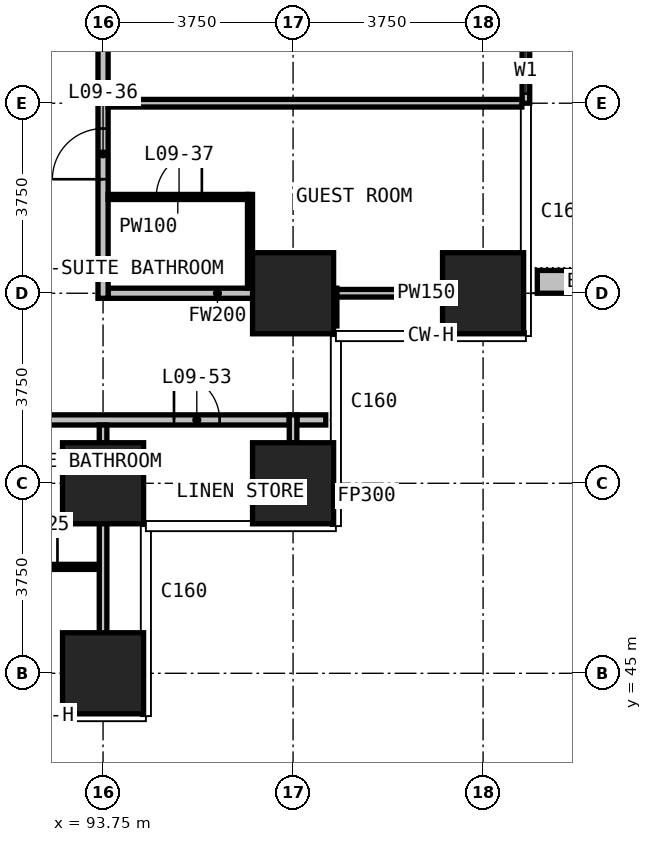
"""IFC4 building model, lengths in metres.
Left out: names, types, materials, properties, quantities, classifications, styles, units other than length and angle.
Written with IfcOpenShell. Run it as: python <this file> out.ifc"""

import sys

from ifc_helpers import new_model, si_unit, direction, frame, frame_2d, origin, origin_2d, place, context, subcontext, project, spatial, rectangle, extrude, element, fill, save


model = new_model("IFC4")
c1 = context("Model", 3, precision=1e-05, world=origin(), true_north=direction((0.0, 1.0)))
c2 = subcontext(c1, "Body", "Model", "MODEL_VIEW")
j1 = project(units=[si_unit("LENGTHUNIT", "METRE"), si_unit("PLANEANGLEUNIT", "RADIAN")], contexts=[c1])
p1 = place(None, origin())
s1 = spatial("IfcSite", under=j1, at=p1, CompositionType="ELEMENT")
p2 = place(p1, origin())
s2 = spatial("IfcBuilding", under=s1, at=p2, CompositionType="ELEMENT")
p3 = place(p2, frame((0.0, 0.0, 49.4)))
s3 = spatial("IfcBuildingStorey", under=s2, at=p3, CompositionType="ELEMENT", Elevation=49.4)
for number, where, z_axis, x_axis in (
    (1, (93.75, 45.0, 0.0), (0.0, 0.0, 1.0), (1.0, 0.0, 0.0)),
    (2, (93.75, 48.75, 0.0), (0.0, 0.0, 1.0), (1.0, 0.0, 0.0)),
    (3, (97.5, 48.75, 0.0), (0.0, 0.0, 1.0), (1.0, 0.0, 0.0)),
    (4, (97.5, 52.5, 0.0), (0.0, 0.0, 1.0), (1.0, 0.0, 0.0)),
    (5, (101.25, 52.5, 0.0), (0.0, 0.0, 1.0), (1.0, 0.0, 0.0)),
):
    element("IfcColumn", number, at=place(p3, frame(where, z_axis=z_axis, x_axis=x_axis)), inside=s3, PredefinedType="COLUMN", context=c2, shape_type="SweptSolid", body=[
        extrude(rectangle(XDim=1.6, YDim=1.6, at=origin_2d()), origin(), (0.0, 0.0, 1.0), 3.3),
    ])
p4 = place(p3, frame((102.095, 56.25, 0.0), z_axis=(0.0, 0.0, 1.0), x_axis=(0.0, 1.0, 0.0)))
e6 = element("IfcWall", 6, at=p4, inside=s3, PredefinedType="SOLIDWALL", context=c2, shape_type="SweptSolid", body=[
    extrude(rectangle(XDim=3.75, YDim=0.15, at=frame_2d((1.875, 0.0))), origin(), (0.0, 0.0, 1.0), 3.0),
])
p5 = place(p4, frame((0.188, 0.0, 0.1)))
e7 = element("IfcOpeningElement", 7, at=p5, cuts=e6, PredefinedType="OPENING", context=c2, shape_type="SweptSolid", body=[
    extrude(rectangle(XDim=0.9, YDim=2.4, at=frame_2d((0.45, 1.2))), frame((0.0, 0.085, 0.0), z_axis=(0.0, -1.0, 0.0), x_axis=(1.0, 0.0, 0.0)), (0.0, 0.0, 1.0), 0.17),
])
p6 = place(p4, frame((1.275, 0.0, 0.0)))
e8 = element("IfcOpeningElement", 8, at=p6, cuts=e6, PredefinedType="OPENING", context=c2, shape_type="SweptSolid", body=[
    extrude(rectangle(XDim=1.2, YDim=2.4, at=frame_2d((0.6, 1.2))), frame((0.0, 0.085, 0.0), z_axis=(0.0, -1.0, 0.0), x_axis=(1.0, 0.0, 0.0)), (0.0, 0.0, 1.0), 0.17),
])
p7 = place(p3, frame((102.32, 52.725, 0.0), z_axis=(0.0, 0.0, 1.0), x_axis=(1.0, 0.0, 0.0)))
e9 = element("IfcWall", 9, at=p7, inside=s3, PredefinedType="USERDEFINED", context=c2, shape_type="SweptSolid", body=[
    extrude(rectangle(XDim=2.33, YDim=0.45, at=frame_2d((1.165, 0.0))), origin(), (0.0, 0.0, 1.0), 1.1),
])
p8 = place(p3, frame((52.575, 50.0, 0.0), z_axis=(0.0, 0.0, 1.0), x_axis=(1.0, 0.0, 0.0)))
e10 = element("IfcWall", 10, at=p8, inside=s3, PredefinedType="PARTITIONING", context=c2, shape_type="SweptSolid", body=[
    extrude(rectangle(XDim=44.85, YDim=0.2, at=frame_2d((22.425, 0.0))), origin(), (0.0, 0.0, 1.0), 3.0),
])
p9 = place(p8, frame((5.925, 0.0, 0.0)))
e11 = element("IfcOpeningElement", 11, at=p9, cuts=e10, PredefinedType="OPENING", context=c2, shape_type="SweptSolid", body=[
    extrude(rectangle(XDim=1.0, YDim=2.2, at=frame_2d((0.5, 1.1))), frame((0.0, 0.11, 0.0), z_axis=(0.0, -1.0, 0.0), x_axis=(1.0, 0.0, 0.0)), (0.0, 0.0, 1.0), 0.22),
])
p10 = place(p8, frame((7.925, 0.0, 0.0)))
e12 = element("IfcOpeningElement", 12, at=p10, cuts=e10, PredefinedType="OPENING", context=c2, shape_type="SweptSolid", body=[
    extrude(rectangle(XDim=1.0, YDim=2.2, at=frame_2d((0.5, 1.1))), frame((0.0, 0.11, 0.0), z_axis=(0.0, -1.0, 0.0), x_axis=(1.0, 0.0, 0.0)), (0.0, 0.0, 1.0), 0.22),
])
p11 = place(p8, frame((13.425, 0.0, 0.0)))
e13 = element("IfcOpeningElement", 13, at=p11, cuts=e10, PredefinedType="OPENING", context=c2, shape_type="SweptSolid", body=[
    extrude(rectangle(XDim=1.0, YDim=2.2, at=frame_2d((0.5, 1.1))), frame((0.0, 0.11, 0.0), z_axis=(0.0, -1.0, 0.0), x_axis=(1.0, 0.0, 0.0)), (0.0, 0.0, 1.0), 0.22),
])
p12 = place(p8, frame((15.425, 0.0, 0.0)))
e14 = element("IfcOpeningElement", 14, at=p12, cuts=e10, PredefinedType="OPENING", context=c2, shape_type="SweptSolid", body=[
    extrude(rectangle(XDim=1.0, YDim=2.2, at=frame_2d((0.5, 1.1))), frame((0.0, 0.11, 0.0), z_axis=(0.0, -1.0, 0.0), x_axis=(1.0, 0.0, 0.0)), (0.0, 0.0, 1.0), 0.22),
])
p13 = place(p8, frame((20.925, 0.0, 0.0)))
e15 = element("IfcOpeningElement", 15, at=p13, cuts=e10, PredefinedType="OPENING", context=c2, shape_type="SweptSolid", body=[
    extrude(rectangle(XDim=1.0, YDim=2.2, at=frame_2d((0.5, 1.1))), frame((0.0, 0.11, 0.0), z_axis=(0.0, -1.0, 0.0), x_axis=(1.0, 0.0, 0.0)), (0.0, 0.0, 1.0), 0.22),
])
p14 = place(p8, frame((22.925, 0.0, 0.0)))
e16 = element("IfcOpeningElement", 16, at=p14, cuts=e10, PredefinedType="OPENING", context=c2, shape_type="SweptSolid", body=[
    extrude(rectangle(XDim=1.0, YDim=2.2, at=frame_2d((0.5, 1.1))), frame((0.0, 0.11, 0.0), z_axis=(0.0, -1.0, 0.0), x_axis=(1.0, 0.0, 0.0)), (0.0, 0.0, 1.0), 0.22),
])
p15 = place(p8, frame((28.425, 0.0, 0.0)))
e17 = element("IfcOpeningElement", 17, at=p15, cuts=e10, PredefinedType="OPENING", context=c2, shape_type="SweptSolid", body=[
    extrude(rectangle(XDim=1.0, YDim=2.2, at=frame_2d((0.5, 1.1))), frame((0.0, 0.11, 0.0), z_axis=(0.0, -1.0, 0.0), x_axis=(1.0, 0.0, 0.0)), (0.0, 0.0, 1.0), 0.22),
])
p16 = place(p8, frame((30.425, 0.0, 0.0)))
e18 = element("IfcOpeningElement", 18, at=p16, cuts=e10, PredefinedType="OPENING", context=c2, shape_type="SweptSolid", body=[
    extrude(rectangle(XDim=1.0, YDim=2.2, at=frame_2d((0.5, 1.1))), frame((0.0, 0.11, 0.0), z_axis=(0.0, -1.0, 0.0), x_axis=(1.0, 0.0, 0.0)), (0.0, 0.0, 1.0), 0.22),
])
p17 = place(p8, frame((35.925, 0.0, 0.0)))
e19 = element("IfcOpeningElement", 19, at=p17, cuts=e10, PredefinedType="OPENING", context=c2, shape_type="SweptSolid", body=[
    extrude(rectangle(XDim=1.0, YDim=2.2, at=frame_2d((0.5, 1.1))), frame((0.0, 0.11, 0.0), z_axis=(0.0, -1.0, 0.0), x_axis=(1.0, 0.0, 0.0)), (0.0, 0.0, 1.0), 0.22),
])
p18 = place(p8, frame((37.925, 0.0, 0.0)))
e20 = element("IfcOpeningElement", 20, at=p18, cuts=e10, PredefinedType="OPENING", context=c2, shape_type="SweptSolid", body=[
    extrude(rectangle(XDim=1.0, YDim=2.2, at=frame_2d((0.5, 1.1))), frame((0.0, 0.11, 0.0), z_axis=(0.0, -1.0, 0.0), x_axis=(1.0, 0.0, 0.0)), (0.0, 0.0, 1.0), 0.22),
])
p19 = place(p8, frame((1.4, 0.0, 0.0)))
e21 = element("IfcOpeningElement", 21, at=p19, cuts=e10, PredefinedType="OPENING", context=c2, shape_type="SweptSolid", body=[
    extrude(rectangle(XDim=0.9, YDim=2.2, at=frame_2d((0.45, 1.1))), frame((0.0, 0.11, 0.0), z_axis=(0.0, -1.0, 0.0), x_axis=(1.0, 0.0, 0.0)), (0.0, 0.0, 1.0), 0.22),
])
p20 = place(p8, frame((42.575, 0.0, 0.0)))
e22 = element("IfcOpeningElement", 22, at=p20, cuts=e10, PredefinedType="OPENING", context=c2, shape_type="SweptSolid", body=[
    extrude(rectangle(XDim=0.9, YDim=2.2, at=frame_2d((0.45, 1.1))), frame((0.0, 0.11, 0.0), z_axis=(0.0, -1.0, 0.0), x_axis=(1.0, 0.0, 0.0)), (0.0, 0.0, 1.0), 0.22),
])
p21 = place(p3, frame((97.575, 50.0, 0.0), z_axis=(0.0, 0.0, 1.0), x_axis=(1.0, 0.0, 0.0)))
e23 = element("IfcWall", 23, at=p21, inside=s3, PredefinedType="PARTITIONING", context=c2, shape_type="SweptSolid", body=[
    extrude(rectangle(XDim=0.57, YDim=0.2, at=frame_2d((0.285, 0.0))), origin(), (0.0, 0.0, 1.0), 3.0),
])
p22 = place(p3, frame((93.85, 52.5, 0.0), z_axis=(0.0, 0.0, 1.0), x_axis=(1.0, 0.0, 0.0)))
e24 = element("IfcWall", 24, at=p22, inside=s3, PredefinedType="PARTITIONING", context=c2, shape_type="SweptSolid", body=[
    extrude(rectangle(XDim=4.315, YDim=0.2, at=frame_2d((2.157, 0.0))), origin(), (0.0, 0.0, 1.0), 3.0),
])
p23 = place(p3, frame((93.75, 52.4, 0.0), z_axis=(0.0, 0.0, 1.0), x_axis=(0.0, 1.0, 0.0)))
e25 = element("IfcWall", 25, at=p23, inside=s3, PredefinedType="PARTITIONING", context=c2, shape_type="SweptSolid", body=[
    extrude(rectangle(XDim=38.365, YDim=0.2, at=frame_2d((19.183, 0.0))), origin(), (0.0, 0.0, 1.0), 3.0),
])
p24 = place(p23, frame((2.35, 0.0, 0.0)))
e26 = element("IfcOpeningElement", 26, at=p24, cuts=e25, PredefinedType="OPENING", context=c2, shape_type="SweptSolid", body=[
    extrude(rectangle(XDim=1.0, YDim=2.2, at=frame_2d((0.5, 1.1))), frame((0.0, 0.11, 0.0), z_axis=(0.0, -1.0, 0.0), x_axis=(1.0, 0.0, 0.0)), (0.0, 0.0, 1.0), 0.22),
])
p25 = place(p23, frame((4.95, 0.0, 0.0)))
e27 = element("IfcOpeningElement", 27, at=p25, cuts=e25, PredefinedType="OPENING", context=c2, shape_type="SweptSolid", body=[
    extrude(rectangle(XDim=1.0, YDim=2.2, at=frame_2d((0.5, 1.1))), frame((0.0, 0.11, 0.0), z_axis=(0.0, -1.0, 0.0), x_axis=(1.0, 0.0, 0.0)), (0.0, 0.0, 1.0), 0.22),
])
p26 = place(p23, frame((16.75, 0.0, 0.0)))
e28 = element("IfcOpeningElement", 28, at=p26, cuts=e25, PredefinedType="OPENING", context=c2, shape_type="SweptSolid", body=[
    extrude(rectangle(XDim=1.0, YDim=2.2, at=frame_2d((0.5, 1.1))), frame((0.0, 0.11, 0.0), z_axis=(0.0, -1.0, 0.0), x_axis=(1.0, 0.0, 0.0)), (0.0, 0.0, 1.0), 0.22),
])
p27 = place(p23, frame((19.95, 0.0, 0.0)))
e29 = element("IfcOpeningElement", 29, at=p27, cuts=e25, PredefinedType="OPENING", context=c2, shape_type="SweptSolid", body=[
    extrude(rectangle(XDim=1.0, YDim=2.2, at=frame_2d((0.5, 1.1))), frame((0.0, 0.11, 0.0), z_axis=(0.0, -1.0, 0.0), x_axis=(1.0, 0.0, 0.0)), (0.0, 0.0, 1.0), 0.22),
])
p28 = place(p23, frame((31.75, 0.0, 0.0)))
e30 = element("IfcOpeningElement", 30, at=p28, cuts=e25, PredefinedType="OPENING", context=c2, shape_type="SweptSolid", body=[
    extrude(rectangle(XDim=1.0, YDim=2.2, at=frame_2d((0.5, 1.1))), frame((0.0, 0.11, 0.0), z_axis=(0.0, -1.0, 0.0), x_axis=(1.0, 0.0, 0.0)), (0.0, 0.0, 1.0), 0.22),
])
p29 = place(p23, frame((35.65, 0.0, 0.0)))
e31 = element("IfcOpeningElement", 31, at=p29, cuts=e25, PredefinedType="OPENING", context=c2, shape_type="SweptSolid", body=[
    extrude(rectangle(XDim=0.9, YDim=2.2, at=frame_2d((0.45, 1.1))), frame((0.0, 0.11, 0.0), z_axis=(0.0, -1.0, 0.0), x_axis=(1.0, 0.0, 0.0)), (0.0, 0.0, 1.0), 0.22),
])
p30 = place(p3, frame((98.265, 51.855, 0.0), z_axis=(0.0, 0.0, 1.0), x_axis=(0.0, 1.0, 0.0)))
e32 = element("IfcWall", 32, at=p30, inside=s3, PredefinedType="PARTITIONING", context=c2, shape_type="SweptSolid", body=[
    extrude(rectangle(XDim=0.745, YDim=0.2, at=frame_2d((0.373, 0.0))), origin(), (0.0, 0.0, 1.0), 3.0),
])
p31 = place(p3, frame((98.365, 52.5, 0.0), z_axis=(0.0, 0.0, 1.0), x_axis=(1.0, 0.0, 0.0)))
e33 = element("IfcWall", 33, at=p31, inside=s3, PredefinedType="PARTITIONING", context=c2, shape_type="SweptSolid", body=[
    extrude(rectangle(XDim=3.53, YDim=0.15, at=frame_2d((1.765, 0.0))), origin(), (0.0, 0.0, 1.0), 3.0),
])
p32 = place(p3, frame((93.85, 56.25, 0.0), z_axis=(0.0, 0.0, 1.0), x_axis=(1.0, 0.0, 0.0)))
e34 = element("IfcWall", 34, at=p32, inside=s3, PredefinedType="PARTITIONING", context=c2, shape_type="SweptSolid", body=[
    extrude(rectangle(XDim=8.165, YDim=0.15, at=frame_2d((4.083, 0.0))), origin(), (0.0, 0.0, 1.0), 3.0),
])
p33 = place(p3, frame((93.75, 44.235, 0.0), z_axis=(0.0, 0.0, 1.0), x_axis=(0.0, 1.0, 0.0)))
e35 = element("IfcWall", 35, at=p33, inside=s3, PredefinedType="PARTITIONING", context=c2, shape_type="SweptSolid", body=[
    extrude(rectangle(XDim=5.665, YDim=0.15, at=frame_2d((2.833, 0.0))), origin(), (0.0, 0.0, 1.0), 3.0),
])
p34 = place(p3, frame((97.5, 48.105, 0.0), z_axis=(0.0, 0.0, 1.0), x_axis=(0.0, 1.0, 0.0)))
e36 = element("IfcWall", 36, at=p34, inside=s3, PredefinedType="PARTITIONING", context=c2, shape_type="SweptSolid", body=[
    extrude(rectangle(XDim=1.995, YDim=0.15, at=frame_2d((0.998, 0.0))), origin(), (0.0, 0.0, 1.0), 3.0),
])
p35 = place(p3, frame((91.8, 47.1, 0.0), z_axis=(0.0, 0.0, 1.0), x_axis=(1.0, 0.0, 0.0)))
e37 = element("IfcWall", 37, at=p35, inside=s3, PredefinedType="PARTITIONING", context=c2, shape_type="SweptSolid", body=[
    extrude(rectangle(XDim=1.875, YDim=0.1, at=frame_2d((0.938, 0.0))), origin(), (0.0, 0.0, 1.0), 3.0),
])
p36 = place(p35, frame((0.15, 0.0, 0.0)))
e38 = element("IfcOpeningElement", 38, at=p36, cuts=e37, PredefinedType="OPENING", context=c2, shape_type="SweptSolid", body=[
    extrude(rectangle(XDim=0.9, YDim=2.2, at=frame_2d((0.45, 1.1))), frame((0.0, 0.06, 0.0), z_axis=(0.0, -1.0, 0.0), x_axis=(1.0, 0.0, 0.0)), (0.0, 0.0, 1.0), 0.12),
])
p37 = place(p3, frame((93.85, 54.4, 0.0), z_axis=(0.0, 0.0, 1.0), x_axis=(1.0, 0.0, 0.0)))
e39 = element("IfcWall", 39, at=p37, inside=s3, PredefinedType="PARTITIONING", context=c2, shape_type="SweptSolid", body=[
    extrude(rectangle(XDim=2.75, YDim=0.1, at=frame_2d((1.375, 0.0))), origin(), (0.0, 0.0, 1.0), 3.0),
])
p38 = place(p37, frame((0.95, 0.0, 0.0)))
e40 = element("IfcOpeningElement", 40, at=p38, cuts=e39, PredefinedType="OPENING", context=c2, shape_type="SweptSolid", body=[
    extrude(rectangle(XDim=0.9, YDim=2.2, at=frame_2d((0.45, 1.1))), frame((0.0, 0.06, 0.0), z_axis=(0.0, -1.0, 0.0), x_axis=(1.0, 0.0, 0.0)), (0.0, 0.0, 1.0), 0.12),
])
p39 = place(p3, frame((96.65, 52.6, 0.0), z_axis=(0.0, 0.0, 1.0), x_axis=(0.0, 1.0, 0.0)))
e41 = element("IfcWall", 41, at=p39, inside=s3, PredefinedType="PARTITIONING", context=c2, shape_type="SweptSolid", body=[
    extrude(rectangle(XDim=1.85, YDim=0.1, at=frame_2d((0.925, 0.0))), origin(), (0.0, 0.0, 1.0), 3.0),
])
p40 = place(p5, origin())
e42 = element("IfcWindow", 42, at=p40, inside=s3, PartitioningType="SINGLE_PANEL", PredefinedType="WINDOW", context=c2, shape_type="SweptSolid", body=[
    extrude(rectangle(XDim=0.9, YDim=2.4, at=frame_2d((0.45, 1.2))), frame((0.0, 0.03, 0.0), z_axis=(0.0, -1.0, 0.0), x_axis=(1.0, 0.0, 0.0)), (0.0, 0.0, 1.0), 0.06),
])
fill(e7, e42)
p41 = place(p36, origin())
e43 = element("IfcDoor", 43, at=p41, inside=s3, OperationType="SINGLE_SWING_RIGHT", PredefinedType="DOOR", context=c2, shape_type="SweptSolid", body=[
    extrude(rectangle(XDim=0.9, YDim=2.2, at=frame_2d((0.45, 1.1))), frame((0.0, 0.025, 0.0), z_axis=(0.0, -1.0, 0.0), x_axis=(1.0, 0.0, 0.0)), (0.0, 0.0, 1.0), 0.05),
])
fill(e38, e43)
p42 = place(p24, origin())
e44 = element("IfcDoor", 44, at=p42, inside=s3, OperationType="SINGLE_SWING_LEFT", PredefinedType="DOOR", context=c2, shape_type="SweptSolid", body=[
    extrude(rectangle(XDim=1.0, YDim=2.2, at=frame_2d((0.5, 1.1))), frame((0.0, 0.025, 0.0), z_axis=(0.0, -1.0, 0.0), x_axis=(1.0, 0.0, 0.0)), (0.0, 0.0, 1.0), 0.05),
])
fill(e26, e44)
p43 = place(p38, origin())
e45 = element("IfcDoor", 45, at=p43, inside=s3, OperationType="SINGLE_SWING_RIGHT", PredefinedType="DOOR", context=c2, shape_type="SweptSolid", body=[
    extrude(rectangle(XDim=0.9, YDim=2.2, at=frame_2d((0.45, 1.1))), frame((0.0, 0.025, 0.0), z_axis=(0.0, -1.0, 0.0), x_axis=(1.0, 0.0, 0.0)), (0.0, 0.0, 1.0), 0.05),
])
fill(e40, e45)
p44 = place(p20, origin())
e46 = element("IfcDoor", 46, at=p44, inside=s3, OperationType="SINGLE_SWING_LEFT", PredefinedType="DOOR", context=c2, shape_type="SweptSolid", body=[
    extrude(rectangle(XDim=0.9, YDim=2.2, at=frame_2d((0.45, 1.1))), frame((0.0, 0.025, 0.0), z_axis=(0.0, -1.0, 0.0), x_axis=(1.0, 0.0, 0.0)), (0.0, 0.0, 1.0), 0.05),
])
fill(e22, e46)
save(model, sys.argv[1])
